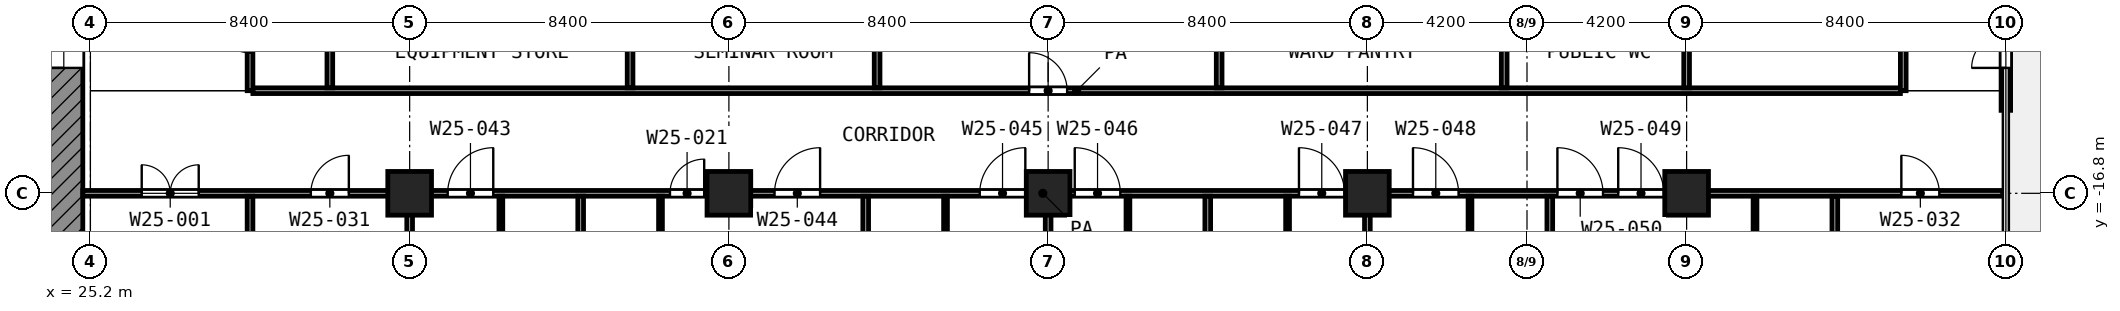
"""IFC4 building model, lengths in metres.
Left out: names, types, materials, properties, quantities, classifications, styles, units other than length and angle.
Written with IfcOpenShell. Run it as: python <this file> out.ifc"""

import sys

from ifc_helpers import new_model, si_unit, direction, frame, frame_2d, origin, origin_2d, place, context, subcontext, project, spatial, rectangle, extrude, element, fill, save


model = new_model("IFC4")
c1 = context("Model", 3, precision=1e-05, world=origin(), true_north=direction((0.0, 1.0)))
c2 = subcontext(c1, "Body", "Model", "MODEL_VIEW")
j1 = project(units=[si_unit("LENGTHUNIT", "METRE"), si_unit("PLANEANGLEUNIT", "RADIAN")], contexts=[c1])
p1 = place(None, origin())
s1 = spatial("IfcSite", under=j1, at=p1, CompositionType="ELEMENT")
p2 = place(p1, origin())
s2 = spatial("IfcBuilding", under=s1, at=p2, CompositionType="ELEMENT")
p3 = place(p2, frame((0.0, 0.0, 111.4)))
s3 = spatial("IfcBuildingStorey", under=s2, at=p3, CompositionType="ELEMENT", Elevation=111.4)
for number, where, z_axis, x_axis in (
    (1, (33.6, -16.8, 0.0), (0.0, 0.0, 1.0), (1.0, 0.0, 0.0)),
    (2, (42.0, -16.8, 0.0), (0.0, 0.0, 1.0), (1.0, 0.0, 0.0)),
    (3, (50.4, -16.8, 0.0), (0.0, 0.0, 1.0), (1.0, 0.0, 0.0)),
    (4, (58.8, -16.8, 0.0), (0.0, 0.0, 1.0), (1.0, 0.0, 0.0)),
    (5, (67.2, -16.8, 0.0), (0.0, 0.0, 1.0), (1.0, 0.0, 0.0)),
):
    element("IfcColumn", number, at=place(p3, frame(where, z_axis=z_axis, x_axis=x_axis)), inside=s3, PredefinedType="COLUMN", context=c2, shape_type="SweptSolid", body=[
        extrude(rectangle(XDim=1.15, YDim=1.15, at=origin_2d()), origin(), (0.0, 0.0, 1.0), 4.2),
    ])
p4 = place(p3, frame((75.6, -14.617, 0.0), z_axis=(0.0, 0.0, 1.0), x_axis=(0.0, 1.0, 0.0)))
e6 = element("IfcWall", 6, at=p4, inside=s3, PredefinedType="SOLIDWALL", context=c2, shape_type="SweptSolid", body=[
    extrude(rectangle(XDim=4.033, YDim=0.25, at=frame_2d((2.017, 0.0))), origin(), (0.0, 0.0, 1.0), 3.48),
])
p5 = place(p4, frame((1.117, 0.0, 0.0)))
e7 = element("IfcOpeningElement", 7, at=p5, cuts=e6, PredefinedType="OPENING", context=c2, shape_type="SweptSolid", body=[
    extrude(rectangle(XDim=1.8, YDim=2.1, at=frame_2d((0.9, 1.05))), frame((0.0, 0.135, 0.0), z_axis=(0.0, -1.0, 0.0), x_axis=(1.0, 0.0, 0.0)), (0.0, 0.0, 1.0), 0.27),
])
p6 = place(p3, frame((24.5, -24.0, 0.0), z_axis=(0.0, 0.0, 1.0), x_axis=(0.0, 1.0, 0.0)))
e8 = element("IfcWall", 8, at=p6, inside=s3, PredefinedType="SHEAR", context=c2, shape_type="SweptSolid", body=[
    extrude(rectangle(XDim=18.6, YDim=1.0, at=frame_2d((9.3, 0.0))), origin(), (0.0, 0.0, 1.0), 3.6),
])
p7 = place(p6, frame((10.5, 0.0, 0.0)))
e9 = element("IfcOpeningElement", 9, at=p7, cuts=e8, PredefinedType="OPENING", context=c2, shape_type="SweptSolid", body=[
    extrude(rectangle(XDim=1.8, YDim=2.1, at=frame_2d((0.9, 1.05))), frame((0.0, 0.51, 0.0), z_axis=(0.0, -1.0, 0.0), x_axis=(1.0, 0.0, 0.0)), (0.0, 0.0, 1.0), 1.02),
])
p8 = place(p3, frame((36.0, -20.1, 0.0), z_axis=(0.0, 0.0, 1.0), x_axis=(0.0, 1.0, 0.0)))
e10 = element("IfcWall", 10, at=p8, inside=s3, PredefinedType="PARTITIONING", context=c2, shape_type="SweptSolid", body=[
    extrude(rectangle(XDim=3.225, YDim=0.1, at=frame_2d((1.613, 0.0))), origin(), (0.0, 0.0, 1.0), 3.6),
])
p9 = place(p3, frame((40.2, -19.499, 0.0), z_axis=(0.0, 0.0, 1.0), x_axis=(0.0, 1.0, 0.0)))
e11 = element("IfcWall", 11, at=p9, inside=s3, PredefinedType="PARTITIONING", context=c2, shape_type="SweptSolid", body=[
    extrude(rectangle(XDim=2.624, YDim=0.1, at=frame_2d((1.312, 0.0))), origin(), (0.0, 0.0, 1.0), 3.6),
])
for number, where, z_axis, x_axis in (
    (12, (47.7, -20.1, 0.0), (0.0, 0.0, 1.0), (0.0, 1.0, 0.0)),
    (13, (52.5, -20.1, 0.0), (0.0, 0.0, 1.0), (0.0, 1.0, 0.0)),
):
    element("IfcWall", number, at=place(p3, frame(where, z_axis=z_axis, x_axis=x_axis)), inside=s3, PredefinedType="PARTITIONING", context=c2, shape_type="SweptSolid", body=[
        extrude(rectangle(XDim=3.225, YDim=0.1, at=frame_2d((1.613, 0.0))), origin(), (0.0, 0.0, 1.0), 3.6),
    ])
for number, where, z_axis, x_axis in (
    (14, (56.7, -19.5, 0.0), (0.0, 0.0, 1.0), (0.0, 1.0, 0.0)),
    (15, (61.5, -19.5, 0.0), (0.0, 0.0, 1.0), (0.0, 1.0, 0.0)),
):
    element("IfcWall", number, at=place(p3, frame(where, z_axis=z_axis, x_axis=x_axis)), inside=s3, PredefinedType="PARTITIONING", context=c2, shape_type="SweptSolid", body=[
        extrude(rectangle(XDim=2.625, YDim=0.1, at=frame_2d((1.312, 0.0))), origin(), (0.0, 0.0, 1.0), 3.6),
    ])
p10 = place(p3, frame((69.0, -20.099, 0.0), z_axis=(0.0, 0.0, 1.0), x_axis=(0.0, 1.0, 0.0)))
e16 = element("IfcWall", 16, at=p10, inside=s3, PredefinedType="PARTITIONING", context=c2, shape_type="SweptSolid", body=[
    extrude(rectangle(XDim=3.224, YDim=0.1, at=frame_2d((1.612, 0.0))), origin(), (0.0, 0.0, 1.0), 3.6),
])
p11 = place(p3, frame((25.0, -16.8, 0.0), z_axis=(0.0, 0.0, 1.0), x_axis=(1.0, 0.0, 0.0)))
e17 = element("IfcWall", 17, at=p11, inside=s3, PredefinedType="PARTITIONING", context=c2, shape_type="SweptSolid", body=[
    extrude(rectangle(XDim=50.52, YDim=0.15, at=frame_2d((25.26, 0.0))), origin(), (0.0, 0.0, 1.0), 3.6),
])
p12 = place(p11, frame((1.55, 0.0, 0.0)))
e18 = element("IfcOpeningElement", 18, at=p12, cuts=e17, PredefinedType="OPENING", context=c2, shape_type="SweptSolid", body=[
    extrude(rectangle(XDim=1.5, YDim=2.1, at=frame_2d((0.75, 1.05))), frame((0.0, 0.085, 0.0), z_axis=(0.0, -1.0, 0.0), x_axis=(1.0, 0.0, 0.0)), (0.0, 0.0, 1.0), 0.17),
])
p13 = place(p11, frame((6.0, 0.0, 0.0)))
e19 = element("IfcOpeningElement", 19, at=p13, cuts=e17, PredefinedType="OPENING", context=c2, shape_type="SweptSolid", body=[
    extrude(rectangle(XDim=1.0, YDim=2.1, at=frame_2d((0.5, 1.05))), frame((0.0, 0.085, 0.0), z_axis=(0.0, -1.0, 0.0), x_axis=(1.0, 0.0, 0.0)), (0.0, 0.0, 1.0), 0.17),
])
p14 = place(p11, frame((9.6, 0.0, 0.0)))
e20 = element("IfcOpeningElement", 20, at=p14, cuts=e17, PredefinedType="OPENING", context=c2, shape_type="SweptSolid", body=[
    extrude(rectangle(XDim=1.2, YDim=2.1, at=frame_2d((0.6, 1.05))), frame((0.0, 0.085, 0.0), z_axis=(0.0, -1.0, 0.0), x_axis=(1.0, 0.0, 0.0)), (0.0, 0.0, 1.0), 0.17),
])
p15 = place(p11, frame((18.2, 0.0, 0.0)))
e21 = element("IfcOpeningElement", 21, at=p15, cuts=e17, PredefinedType="OPENING", context=c2, shape_type="SweptSolid", body=[
    extrude(rectangle(XDim=1.2, YDim=2.1, at=frame_2d((0.6, 1.05))), frame((0.0, 0.085, 0.0), z_axis=(0.0, -1.0, 0.0), x_axis=(1.0, 0.0, 0.0)), (0.0, 0.0, 1.0), 0.17),
])
p16 = place(p11, frame((15.45, 0.0, 0.0)))
e22 = element("IfcOpeningElement", 22, at=p16, cuts=e17, PredefinedType="OPENING", context=c2, shape_type="SweptSolid", body=[
    extrude(rectangle(XDim=0.9, YDim=2.1, at=frame_2d((0.45, 1.05))), frame((0.0, 0.085, 0.0), z_axis=(0.0, -1.0, 0.0), x_axis=(1.0, 0.0, 0.0)), (0.0, 0.0, 1.0), 0.17),
])
p17 = place(p11, frame((23.6, 0.0, 0.0)))
e23 = element("IfcOpeningElement", 23, at=p17, cuts=e17, PredefinedType="OPENING", context=c2, shape_type="SweptSolid", body=[
    extrude(rectangle(XDim=1.2, YDim=2.1, at=frame_2d((0.6, 1.05))), frame((0.0, 0.085, 0.0), z_axis=(0.0, -1.0, 0.0), x_axis=(1.0, 0.0, 0.0)), (0.0, 0.0, 1.0), 0.17),
])
p18 = place(p11, frame((26.1, 0.0, 0.0)))
e24 = element("IfcOpeningElement", 24, at=p18, cuts=e17, PredefinedType="OPENING", context=c2, shape_type="SweptSolid", body=[
    extrude(rectangle(XDim=1.2, YDim=2.1, at=frame_2d((0.6, 1.05))), frame((0.0, 0.085, 0.0), z_axis=(0.0, -1.0, 0.0), x_axis=(1.0, 0.0, 0.0)), (0.0, 0.0, 1.0), 0.17),
])
p19 = place(p11, frame((32.0, 0.0, 0.0)))
e25 = element("IfcOpeningElement", 25, at=p19, cuts=e17, PredefinedType="OPENING", context=c2, shape_type="SweptSolid", body=[
    extrude(rectangle(XDim=1.2, YDim=2.1, at=frame_2d((0.6, 1.05))), frame((0.0, 0.085, 0.0), z_axis=(0.0, -1.0, 0.0), x_axis=(1.0, 0.0, 0.0)), (0.0, 0.0, 1.0), 0.17),
])
p20 = place(p11, frame((35.0, 0.0, 0.0)))
e26 = element("IfcOpeningElement", 26, at=p20, cuts=e17, PredefinedType="OPENING", context=c2, shape_type="SweptSolid", body=[
    extrude(rectangle(XDim=1.2, YDim=2.1, at=frame_2d((0.6, 1.05))), frame((0.0, 0.085, 0.0), z_axis=(0.0, -1.0, 0.0), x_axis=(1.0, 0.0, 0.0)), (0.0, 0.0, 1.0), 0.17),
])
p21 = place(p11, frame((40.4, 0.0, 0.0)))
e27 = element("IfcOpeningElement", 27, at=p21, cuts=e17, PredefinedType="OPENING", context=c2, shape_type="SweptSolid", body=[
    extrude(rectangle(XDim=1.2, YDim=2.1, at=frame_2d((0.6, 1.05))), frame((0.0, 0.085, 0.0), z_axis=(0.0, -1.0, 0.0), x_axis=(1.0, 0.0, 0.0)), (0.0, 0.0, 1.0), 0.17),
])
p22 = place(p11, frame((38.8, 0.0, 0.0)))
e28 = element("IfcOpeningElement", 28, at=p22, cuts=e17, PredefinedType="OPENING", context=c2, shape_type="SweptSolid", body=[
    extrude(rectangle(XDim=1.2, YDim=2.1, at=frame_2d((0.6, 1.05))), frame((0.0, 0.085, 0.0), z_axis=(0.0, -1.0, 0.0), x_axis=(1.0, 0.0, 0.0)), (0.0, 0.0, 1.0), 0.17),
])
p23 = place(p11, frame((47.85, 0.0, 0.0)))
e29 = element("IfcOpeningElement", 29, at=p23, cuts=e17, PredefinedType="OPENING", context=c2, shape_type="SweptSolid", body=[
    extrude(rectangle(XDim=1.0, YDim=2.1, at=frame_2d((0.5, 1.05))), frame((0.0, 0.085, 0.0), z_axis=(0.0, -1.0, 0.0), x_axis=(1.0, 0.0, 0.0)), (0.0, 0.0, 1.0), 0.17),
])
p24 = place(p3, frame((29.475, -14.1, 0.0), z_axis=(0.0, 0.0, 1.0), x_axis=(1.0, 0.0, 0.0)))
e30 = element("IfcWall", 30, at=p24, inside=s3, PredefinedType="PARTITIONING", context=c2, shape_type="SweptSolid", body=[
    extrude(rectangle(XDim=43.35, YDim=0.15, at=frame_2d((21.675, 0.0))), origin(), (0.0, 0.0, 1.0), 3.6),
])
p25 = place(p24, frame((20.425, 0.0, 0.0)))
e31 = element("IfcOpeningElement", 31, at=p25, cuts=e30, PredefinedType="OPENING", context=c2, shape_type="SweptSolid", body=[
    extrude(rectangle(XDim=1.0, YDim=2.1, at=frame_2d((0.5, 1.05))), frame((0.0, 0.085, 0.0), z_axis=(0.0, -1.0, 0.0), x_axis=(1.0, 0.0, 0.0)), (0.0, 0.0, 1.0), 0.17),
])
p26 = place(p3, frame((29.4, -25.2, 0.0), z_axis=(0.0, 0.0, 1.0), x_axis=(0.0, 1.0, 0.0)))
e32 = element("IfcWall", 32, at=p26, inside=s3, PredefinedType="PARTITIONING", context=c2, shape_type="SweptSolid", body=[
    extrude(rectangle(XDim=8.325, YDim=0.15, at=frame_2d((4.163, 0.0))), origin(), (0.0, 0.0, 1.0), 3.6),
])
p27 = place(p3, frame((29.4, -14.1, 0.0), z_axis=(0.0, 0.0, 1.0), x_axis=(0.0, 1.0, 0.0)))
e33 = element("IfcWall", 33, at=p27, inside=s3, PredefinedType="PARTITIONING", context=c2, shape_type="SweptSolid", body=[
    extrude(rectangle(XDim=3.0, YDim=0.15, at=frame_2d((1.5, 0.0))), origin(), (0.0, 0.0, 1.0), 3.6),
])
p28 = place(p27, frame((1.0, 0.0, 0.0)))
e34 = element("IfcOpeningElement", 34, at=p28, cuts=e33, PredefinedType="OPENING", context=c2, shape_type="SweptSolid", body=[
    extrude(rectangle(XDim=1.0, YDim=2.1, at=frame_2d((0.5, 1.05))), frame((0.0, 0.085, 0.0), z_axis=(0.0, -1.0, 0.0), x_axis=(1.0, 0.0, 0.0)), (0.0, 0.0, 1.0), 0.17),
])
p29 = place(p3, frame((31.5, -14.025, 0.0), z_axis=(0.0, 0.0, 1.0), x_axis=(0.0, 1.0, 0.0)))
e35 = element("IfcWall", 35, at=p29, inside=s3, PredefinedType="PARTITIONING", context=c2, shape_type="SweptSolid", body=[
    extrude(rectangle(XDim=2.85, YDim=0.15, at=frame_2d((1.425, 0.0))), origin(), (0.0, 0.0, 1.0), 3.6),
])
for number, where, z_axis, x_axis in (
    (36, (33.6, -25.12, 0.0), (0.0, 0.0, 1.0), (0.0, 1.0, 0.0)),
    (37, (38.1, -25.12, 0.0), (0.0, 0.0, 1.0), (0.0, 1.0, 0.0)),
):
    element("IfcWall", number, at=place(p3, frame(where, z_axis=z_axis, x_axis=x_axis)), inside=s3, PredefinedType="PARTITIONING", context=c2, shape_type="SweptSolid", body=[
        extrude(rectangle(XDim=8.245, YDim=0.15, at=frame_2d((4.123, 0.0))), origin(), (0.0, 0.0, 1.0), 2.7),
    ])
p30 = place(p3, frame((39.4, -14.025, 0.0), z_axis=(0.0, 0.0, 1.0), x_axis=(0.0, 1.0, 0.0)))
e38 = element("IfcWall", 38, at=p30, inside=s3, PredefinedType="PARTITIONING", context=c2, shape_type="SweptSolid", body=[
    extrude(rectangle(XDim=2.85, YDim=0.15, at=frame_2d((1.425, 0.0))), origin(), (0.0, 0.0, 1.0), 3.6),
])
p31 = place(p3, frame((45.6, -25.12, 0.0), z_axis=(0.0, 0.0, 1.0), x_axis=(0.0, 1.0, 0.0)))
e39 = element("IfcWall", 39, at=p31, inside=s3, PredefinedType="PARTITIONING", context=c2, shape_type="SweptSolid", body=[
    extrude(rectangle(XDim=8.245, YDim=0.15, at=frame_2d((4.123, 0.0))), origin(), (0.0, 0.0, 1.0), 2.7),
])
p32 = place(p3, frame((45.9, -14.025, 0.0), z_axis=(0.0, 0.0, 1.0), x_axis=(0.0, 1.0, 0.0)))
e40 = element("IfcWall", 40, at=p32, inside=s3, PredefinedType="PARTITIONING", context=c2, shape_type="SweptSolid", body=[
    extrude(rectangle(XDim=2.85, YDim=0.15, at=frame_2d((1.425, 0.0))), origin(), (0.0, 0.0, 1.0), 3.6),
])
p33 = place(p3, frame((50.4, -25.12, 0.0), z_axis=(0.0, 0.0, 1.0), x_axis=(0.0, 1.0, 0.0)))
e41 = element("IfcWall", 41, at=p33, inside=s3, PredefinedType="PARTITIONING", context=c2, shape_type="SweptSolid", body=[
    extrude(rectangle(XDim=8.245, YDim=0.15, at=frame_2d((4.123, 0.0))), origin(), (0.0, 0.0, 1.0), 3.6),
])
p34 = place(p3, frame((54.6, -25.12, 0.0), z_axis=(0.0, 0.0, 1.0), x_axis=(0.0, 1.0, 0.0)))
e42 = element("IfcWall", 42, at=p34, inside=s3, PredefinedType="PARTITIONING", context=c2, shape_type="SweptSolid", body=[
    extrude(rectangle(XDim=8.245, YDim=0.15, at=frame_2d((4.123, 0.0))), origin(), (0.0, 0.0, 1.0), 2.7),
])
p35 = place(p3, frame((54.9, -14.025, 0.0), z_axis=(0.0, 0.0, 1.0), x_axis=(0.0, 1.0, 0.0)))
e43 = element("IfcWall", 43, at=p35, inside=s3, PredefinedType="PARTITIONING", context=c2, shape_type="SweptSolid", body=[
    extrude(rectangle(XDim=2.85, YDim=0.15, at=frame_2d((1.425, 0.0))), origin(), (0.0, 0.0, 1.0), 3.6),
])
p36 = place(p3, frame((58.8, -25.12, 0.0), z_axis=(0.0, 0.0, 1.0), x_axis=(0.0, 1.0, 0.0)))
e44 = element("IfcWall", 44, at=p36, inside=s3, PredefinedType="PARTITIONING", context=c2, shape_type="SweptSolid", body=[
    extrude(rectangle(XDim=8.245, YDim=0.15, at=frame_2d((4.123, 0.0))), origin(), (0.0, 0.0, 1.0), 3.6),
])
p37 = place(p3, frame((62.4, -14.025, 0.0), z_axis=(0.0, 0.0, 1.0), x_axis=(0.0, 1.0, 0.0)))
e45 = element("IfcWall", 45, at=p37, inside=s3, PredefinedType="PARTITIONING", context=c2, shape_type="SweptSolid", body=[
    extrude(rectangle(XDim=2.85, YDim=0.15, at=frame_2d((1.425, 0.0))), origin(), (0.0, 0.0, 1.0), 3.6),
])
p38 = place(p3, frame((63.6, -25.12, 0.0), z_axis=(0.0, 0.0, 1.0), x_axis=(0.0, 1.0, 0.0)))
e46 = element("IfcWall", 46, at=p38, inside=s3, PredefinedType="PARTITIONING", context=c2, shape_type="SweptSolid", body=[
    extrude(rectangle(XDim=8.245, YDim=0.15, at=frame_2d((4.123, 0.0))), origin(), (0.0, 0.0, 1.0), 2.7),
])
p39 = place(p3, frame((67.2, -14.025, 0.0), z_axis=(0.0, 0.0, 1.0), x_axis=(0.0, 1.0, 0.0)))
e47 = element("IfcWall", 47, at=p39, inside=s3, PredefinedType="PARTITIONING", context=c2, shape_type="SweptSolid", body=[
    extrude(rectangle(XDim=2.85, YDim=0.15, at=frame_2d((1.425, 0.0))), origin(), (0.0, 0.0, 1.0), 3.6),
])
p40 = place(p3, frame((71.1, -23.587, 0.0), z_axis=(0.0, 0.0, 1.0), x_axis=(0.0, 1.0, 0.0)))
e48 = element("IfcWall", 48, at=p40, inside=s3, PredefinedType="PARTITIONING", context=c2, shape_type="SweptSolid", body=[
    extrude(rectangle(XDim=6.712, YDim=0.15, at=frame_2d((3.356, 0.0))), origin(), (0.0, 0.0, 1.0), 2.7),
])
p41 = place(p3, frame((72.9, -14.1, 0.0), z_axis=(0.0, 0.0, 1.0), x_axis=(0.0, 1.0, 0.0)))
e49 = element("IfcWall", 49, at=p41, inside=s3, PredefinedType="PARTITIONING", context=c2, shape_type="SweptSolid", body=[
    extrude(rectangle(XDim=3.0, YDim=0.15, at=frame_2d((1.5, 0.0))), origin(), (0.0, 0.0, 1.0), 3.6),
])
p42 = place(p5, origin())
e50 = element("IfcDoor", 50, at=p42, inside=s3, OperationType="DOUBLE_DOOR_SINGLE_SWING", PredefinedType="DOOR", context=c2, shape_type="SweptSolid", body=[
    extrude(rectangle(XDim=1.8, YDim=2.1, at=frame_2d((0.9, 1.05))), frame((0.0, 0.025, 0.0), z_axis=(0.0, -1.0, 0.0), x_axis=(1.0, 0.0, 0.0)), (0.0, 0.0, 1.0), 0.05),
])
fill(e7, e50)
p43 = place(p7, origin())
e51 = element("IfcDoor", 51, at=p43, inside=s3, OperationType="DOUBLE_DOOR_SINGLE_SWING", PredefinedType="DOOR", context=c2, shape_type="SweptSolid", body=[
    extrude(rectangle(XDim=1.8, YDim=2.1, at=frame_2d((0.9, 1.05))), frame((0.0, 0.025, 0.0), z_axis=(0.0, -1.0, 0.0), x_axis=(1.0, 0.0, 0.0)), (0.0, 0.0, 1.0), 0.05),
])
fill(e9, e51)
p44 = place(p12, origin())
e52 = element("IfcDoor", 52, at=p44, inside=s3, OperationType="DOUBLE_DOOR_SINGLE_SWING", PredefinedType="DOOR", context=c2, shape_type="SweptSolid", body=[
    extrude(rectangle(XDim=1.5, YDim=2.1, at=frame_2d((0.75, 1.05))), frame((0.0, 0.025, 0.0), z_axis=(0.0, -1.0, 0.0), x_axis=(1.0, 0.0, 0.0)), (0.0, 0.0, 1.0), 0.05),
])
fill(e18, e52)
p45 = place(p25, origin())
e53 = element("IfcDoor", 53, at=p45, inside=s3, OperationType="SINGLE_SWING_LEFT", PredefinedType="DOOR", context=c2, shape_type="SweptSolid", body=[
    extrude(rectangle(XDim=1.0, YDim=2.1, at=frame_2d((0.5, 1.05))), frame((0.0, 0.025, 0.0), z_axis=(0.0, -1.0, 0.0), x_axis=(1.0, 0.0, 0.0)), (0.0, 0.0, 1.0), 0.05),
])
fill(e31, e53)
p46 = place(p13, origin())
e54 = element("IfcDoor", 54, at=p46, inside=s3, OperationType="SINGLE_SWING_RIGHT", PredefinedType="DOOR", context=c2, shape_type="SweptSolid", body=[
    extrude(rectangle(XDim=1.0, YDim=2.1, at=frame_2d((0.5, 1.05))), frame((0.0, 0.025, 0.0), z_axis=(0.0, -1.0, 0.0), x_axis=(1.0, 0.0, 0.0)), (0.0, 0.0, 1.0), 0.05),
])
fill(e19, e54)
p47 = place(p14, origin())
e55 = element("IfcDoor", 55, at=p47, inside=s3, OperationType="SINGLE_SWING_RIGHT", PredefinedType="DOOR", context=c2, shape_type="SweptSolid", body=[
    extrude(rectangle(XDim=1.2, YDim=2.1, at=frame_2d((0.6, 1.05))), frame((0.0, 0.025, 0.0), z_axis=(0.0, -1.0, 0.0), x_axis=(1.0, 0.0, 0.0)), (0.0, 0.0, 1.0), 0.05),
])
fill(e20, e55)
p48 = place(p15, origin())
e56 = element("IfcDoor", 56, at=p48, inside=s3, OperationType="SINGLE_SWING_RIGHT", PredefinedType="DOOR", context=c2, shape_type="SweptSolid", body=[
    extrude(rectangle(XDim=1.2, YDim=2.1, at=frame_2d((0.6, 1.05))), frame((0.0, 0.025, 0.0), z_axis=(0.0, -1.0, 0.0), x_axis=(1.0, 0.0, 0.0)), (0.0, 0.0, 1.0), 0.05),
])
fill(e21, e56)
p49 = place(p16, origin())
e57 = element("IfcDoor", 57, at=p49, inside=s3, OperationType="SINGLE_SWING_RIGHT", PredefinedType="DOOR", context=c2, shape_type="SweptSolid", body=[
    extrude(rectangle(XDim=0.9, YDim=2.1, at=frame_2d((0.45, 1.05))), frame((0.0, 0.025, 0.0), z_axis=(0.0, -1.0, 0.0), x_axis=(1.0, 0.0, 0.0)), (0.0, 0.0, 1.0), 0.05),
])
fill(e22, e57)
p50 = place(p17, origin())
e58 = element("IfcDoor", 58, at=p50, inside=s3, OperationType="SINGLE_SWING_RIGHT", PredefinedType="DOOR", context=c2, shape_type="SweptSolid", body=[
    extrude(rectangle(XDim=1.2, YDim=2.1, at=frame_2d((0.6, 1.05))), frame((0.0, 0.025, 0.0), z_axis=(0.0, -1.0, 0.0), x_axis=(1.0, 0.0, 0.0)), (0.0, 0.0, 1.0), 0.05),
])
fill(e23, e58)
p51 = place(p18, origin())
e59 = element("IfcDoor", 59, at=p51, inside=s3, OperationType="SINGLE_SWING_LEFT", PredefinedType="DOOR", context=c2, shape_type="SweptSolid", body=[
    extrude(rectangle(XDim=1.2, YDim=2.1, at=frame_2d((0.6, 1.05))), frame((0.0, 0.025, 0.0), z_axis=(0.0, -1.0, 0.0), x_axis=(1.0, 0.0, 0.0)), (0.0, 0.0, 1.0), 0.05),
])
fill(e24, e59)
p52 = place(p19, origin())
e60 = element("IfcDoor", 60, at=p52, inside=s3, OperationType="SINGLE_SWING_LEFT", PredefinedType="DOOR", context=c2, shape_type="SweptSolid", body=[
    extrude(rectangle(XDim=1.2, YDim=2.1, at=frame_2d((0.6, 1.05))), frame((0.0, 0.025, 0.0), z_axis=(0.0, -1.0, 0.0), x_axis=(1.0, 0.0, 0.0)), (0.0, 0.0, 1.0), 0.05),
])
fill(e25, e60)
p53 = place(p20, origin())
e61 = element("IfcDoor", 61, at=p53, inside=s3, OperationType="SINGLE_SWING_LEFT", PredefinedType="DOOR", context=c2, shape_type="SweptSolid", body=[
    extrude(rectangle(XDim=1.2, YDim=2.1, at=frame_2d((0.6, 1.05))), frame((0.0, 0.025, 0.0), z_axis=(0.0, -1.0, 0.0), x_axis=(1.0, 0.0, 0.0)), (0.0, 0.0, 1.0), 0.05),
])
fill(e26, e61)
p54 = place(p21, origin())
e62 = element("IfcDoor", 62, at=p54, inside=s3, OperationType="SINGLE_SWING_LEFT", PredefinedType="DOOR", context=c2, shape_type="SweptSolid", body=[
    extrude(rectangle(XDim=1.2, YDim=2.1, at=frame_2d((0.6, 1.05))), frame((0.0, 0.025, 0.0), z_axis=(0.0, -1.0, 0.0), x_axis=(1.0, 0.0, 0.0)), (0.0, 0.0, 1.0), 0.05),
])
fill(e27, e62)
p55 = place(p22, origin())
e63 = element("IfcDoor", 63, at=p55, inside=s3, OperationType="SINGLE_SWING_LEFT", PredefinedType="DOOR", context=c2, shape_type="SweptSolid", body=[
    extrude(rectangle(XDim=1.2, YDim=2.1, at=frame_2d((0.6, 1.05))), frame((0.0, 0.025, 0.0), z_axis=(0.0, -1.0, 0.0), x_axis=(1.0, 0.0, 0.0)), (0.0, 0.0, 1.0), 0.05),
])
fill(e28, e63)
p56 = place(p23, origin())
e64 = element("IfcDoor", 64, at=p56, inside=s3, OperationType="SINGLE_SWING_LEFT", PredefinedType="DOOR", context=c2, shape_type="SweptSolid", body=[
    extrude(rectangle(XDim=1.0, YDim=2.1, at=frame_2d((0.5, 1.05))), frame((0.0, 0.025, 0.0), z_axis=(0.0, -1.0, 0.0), x_axis=(1.0, 0.0, 0.0)), (0.0, 0.0, 1.0), 0.05),
])
fill(e29, e64)
save(model, sys.argv[1])
